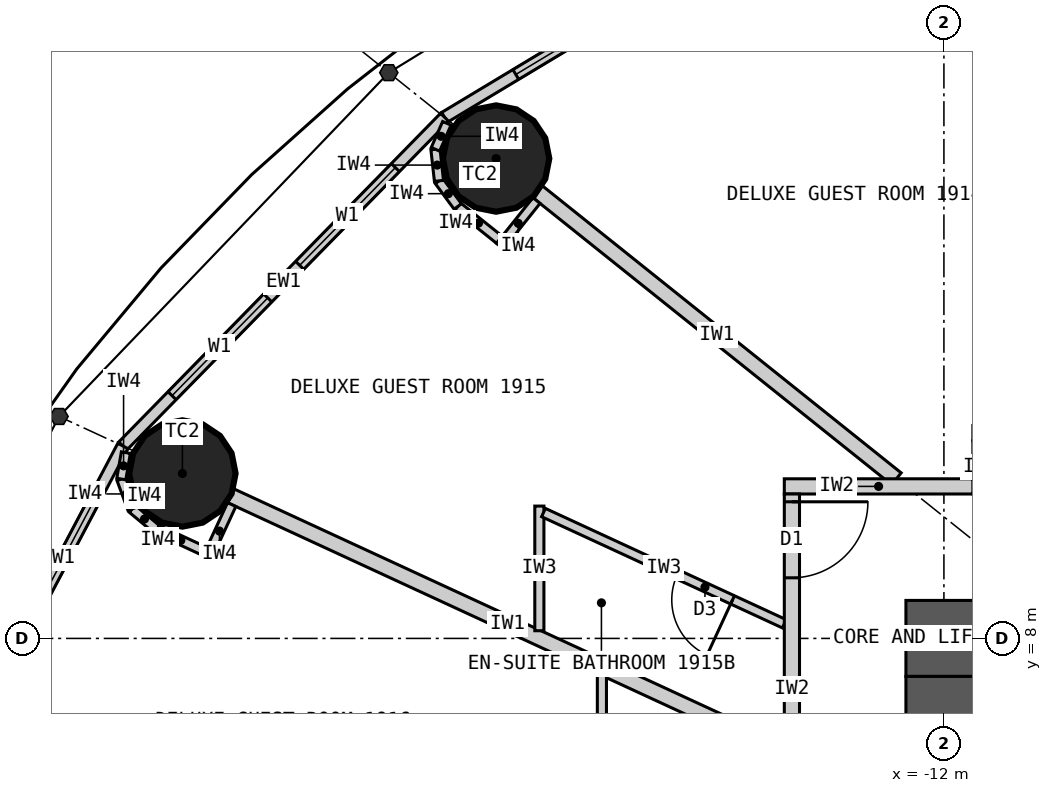
"""IFC4 building model, lengths in metres.
Left out: names, types, materials, properties, quantities, classifications, styles, units other than length and angle.
Written with IfcOpenShell. Run it as: python <this file> out.ifc"""

import sys

from ifc_helpers import new_model, si_unit, direction, frame, frame_2d, origin, origin_2d, place, context, subcontext, project, spatial, rectangle, circle, extrude, element, fill, save


model = new_model("IFC4")
c1 = context("Model", 3, precision=1e-05, world=origin(), true_north=direction((0.0, 1.0)))
c2 = subcontext(c1, "Body", "Model", "MODEL_VIEW")
j1 = project(units=[si_unit("LENGTHUNIT", "METRE"), si_unit("PLANEANGLEUNIT", "RADIAN")], contexts=[c1])
p1 = place(None, origin())
s1 = spatial("IfcSite", under=j1, at=p1, CompositionType="ELEMENT")
p2 = place(p1, origin())
s2 = spatial("IfcBuilding", under=s1, at=p2, CompositionType="ELEMENT")
p3 = place(p2, frame((0.0, 0.0, 77.1)))
s3 = spatial("IfcBuildingStorey", under=s2, at=p3, CompositionType="ELEMENT", Elevation=77.1)
for number, where, z_axis, x_axis in (
    (1, (-17.892, 14.313, 0.0), (0.0, 0.0, 1.0), (1.0, 0.0, 0.0)),
    (2, (-22.019, 10.17, 0.0), (0.0, 0.0, 1.0), (1.0, 0.0, 0.0)),
):
    element("IfcColumn", number, at=place(p3, frame(where, z_axis=z_axis, x_axis=x_axis)), inside=s3, PredefinedType="COLUMN", context=c2, shape_type="SweptSolid", body=[
        extrude(circle(Radius=0.7, at=origin_2d()), origin(), (0.0, 0.0, 1.0), 3.3),
    ])
p4 = place(p3, frame((-12.5, 8.0, 0.0), z_axis=(0.0, 0.0, 1.0), x_axis=(1.0, 0.0, 0.0)))
e3 = element("IfcWall", 3, at=p4, inside=s3, PredefinedType="SHEAR", context=c2, shape_type="SweptSolid", body=[
    extrude(rectangle(XDim=25.0, YDim=1.0, at=frame_2d((12.5, 0.0))), origin(), (0.0, 0.0, 1.0), 3.3),
])
p5 = place(p4, frame((11.2, 0.0, 0.0)))
e4 = element("IfcOpeningElement", 4, at=p5, cuts=e3, PredefinedType="OPENING", context=c2, shape_type="SweptSolid", body=[
    extrude(rectangle(XDim=1.2, YDim=2.2, at=frame_2d((0.6, 1.1))), frame((0.0, 0.51, 0.0), z_axis=(0.0, -1.0, 0.0), x_axis=(1.0, 0.0, 0.0)), (0.0, 0.0, 1.0), 1.02),
])
p6 = place(p4, frame((18.8, 0.0, 0.0)))
e5 = element("IfcOpeningElement", 5, at=p6, cuts=e3, PredefinedType="OPENING", context=c2, shape_type="SweptSolid", body=[
    extrude(rectangle(XDim=0.9, YDim=2.2, at=frame_2d((0.45, 1.1))), frame((0.0, 0.51, 0.0), z_axis=(0.0, -1.0, 0.0), x_axis=(1.0, 0.0, 0.0)), (0.0, 0.0, 1.0), 1.02),
])
p7 = place(p3, frame((-12.0, 7.5, 0.0), z_axis=(0.0, 0.0, 1.0), x_axis=(0.0, -1.0, 0.0)))
e6 = element("IfcWall", 6, at=p7, inside=s3, PredefinedType="SHEAR", context=c2, shape_type="SweptSolid", body=[
    extrude(rectangle(XDim=15.0, YDim=1.0, at=frame_2d((7.5, 0.0))), origin(), (0.0, 0.0, 1.0), 3.3),
])
p8 = place(p7, frame((6.6, 0.0, 0.0)))
e7 = element("IfcOpeningElement", 7, at=p8, cuts=e6, PredefinedType="OPENING", context=c2, shape_type="SweptSolid", body=[
    extrude(rectangle(XDim=1.8, YDim=2.2, at=frame_2d((0.9, 1.1))), frame((0.0, 0.51, 0.0), z_axis=(0.0, -1.0, 0.0), x_axis=(1.0, 0.0, 0.0)), (0.0, 0.0, 1.0), 1.02),
])
p9 = place(p3, frame((-13.096, 18.147, 0.0), z_axis=(0.0, 0.0, 1.0), x_axis=(-0.856983180864, -0.515344377787, 0.0)))
e8 = element("IfcWall", 8, at=p9, inside=s3, PredefinedType="ELEMENTEDWALL", context=c2, shape_type="SweptSolid", body=[
    extrude(rectangle(XDim=6.386, YDim=0.15, at=frame_2d((3.193, 0.0))), origin(), (0.0, 0.0, 1.0), 3.12),
])
p10 = place(p9, frame((1.093, 0.0, 0.9)))
e9 = element("IfcOpeningElement", 9, at=p10, cuts=e8, PredefinedType="OPENING", context=c2, shape_type="SweptSolid", body=[
    extrude(rectangle(XDim=1.8, YDim=1.9, at=frame_2d((0.9, 0.95))), frame((0.0, 0.085, 0.0), z_axis=(0.0, -1.0, 0.0), x_axis=(1.0, 0.0, 0.0)), (0.0, 0.0, 1.0), 0.17),
])
p11 = place(p9, frame((3.493, 0.0, 0.9)))
e10 = element("IfcOpeningElement", 10, at=p11, cuts=e8, PredefinedType="OPENING", context=c2, shape_type="SweptSolid", body=[
    extrude(rectangle(XDim=1.8, YDim=1.9, at=frame_2d((0.9, 0.95))), frame((0.0, 0.085, 0.0), z_axis=(0.0, -1.0, 0.0), x_axis=(1.0, 0.0, 0.0)), (0.0, 0.0, 1.0), 0.17),
])
p12 = place(p3, frame((-18.57, 14.856, 0.0), z_axis=(0.0, 0.0, 1.0), x_axis=(-0.699602905915, -0.714531856557, 0.0)))
e11 = element("IfcWall", 11, at=p12, inside=s3, PredefinedType="ELEMENTEDWALL", context=c2, shape_type="SweptSolid", body=[
    extrude(rectangle(XDim=6.051, YDim=0.15, at=frame_2d((3.025, 0.0))), origin(), (0.0, 0.0, 1.0), 3.12),
])
p13 = place(p12, frame((0.926, 0.0, 0.9)))
e12 = element("IfcOpeningElement", 12, at=p13, cuts=e11, PredefinedType="OPENING", context=c2, shape_type="SweptSolid", body=[
    extrude(rectangle(XDim=1.8, YDim=1.9, at=frame_2d((0.9, 0.95))), frame((0.0, 0.085, 0.0), z_axis=(0.0, -1.0, 0.0), x_axis=(1.0, 0.0, 0.0)), (0.0, 0.0, 1.0), 0.17),
])
p14 = place(p12, frame((3.325, 0.0, 0.9)))
e13 = element("IfcOpeningElement", 13, at=p14, cuts=e11, PredefinedType="OPENING", context=c2, shape_type="SweptSolid", body=[
    extrude(rectangle(XDim=1.8, YDim=1.9, at=frame_2d((0.9, 0.95))), frame((0.0, 0.085, 0.0), z_axis=(0.0, -1.0, 0.0), x_axis=(1.0, 0.0, 0.0)), (0.0, 0.0, 1.0), 0.17),
])
p15 = place(p3, frame((-22.803, 10.532, 0.0), z_axis=(0.0, 0.0, 1.0), x_axis=(-0.467296867008, -0.884100468321, 0.0)))
e14 = element("IfcWall", 14, at=p15, inside=s3, PredefinedType="ELEMENTEDWALL", context=c2, shape_type="SweptSolid", body=[
    extrude(rectangle(XDim=5.734, YDim=0.15, at=frame_2d((2.867, 0.0))), origin(), (0.0, 0.0, 1.0), 3.12),
])
p16 = place(p15, frame((0.767, 0.0, 0.9)))
e15 = element("IfcOpeningElement", 15, at=p16, cuts=e14, PredefinedType="OPENING", context=c2, shape_type="SweptSolid", body=[
    extrude(rectangle(XDim=1.8, YDim=1.9, at=frame_2d((0.9, 0.95))), frame((0.0, 0.085, 0.0), z_axis=(0.0, -1.0, 0.0), x_axis=(1.0, 0.0, 0.0)), (0.0, 0.0, 1.0), 0.17),
])
p17 = place(p15, frame((3.167, 0.0, 0.9)))
e16 = element("IfcOpeningElement", 16, at=p17, cuts=e14, PredefinedType="OPENING", context=c2, shape_type="SweptSolid", body=[
    extrude(rectangle(XDim=1.8, YDim=1.9, at=frame_2d((0.9, 0.95))), frame((0.0, 0.085, 0.0), z_axis=(0.0, -1.0, 0.0), x_axis=(1.0, 0.0, 0.0)), (0.0, 0.0, 1.0), 0.17),
])
p18 = place(p3, frame((-7.289, 10.1, 0.0), z_axis=(0.0, 0.0, 1.0), x_axis=(-0.585198353053, 0.810890182197, 0.0)))
e17 = element("IfcWall", 17, at=p18, inside=s3, PredefinedType="PARTITIONING", context=c2, shape_type="SweptSolid", body=[
    extrude(rectangle(XDim=8.36, YDim=0.2, at=frame_2d((4.18, 0.0))), origin(), (0.0, 0.0, 1.0), 2.32),
])
p19 = place(p3, frame((-12.625, 10.1, 0.0), z_axis=(0.0, 0.0, 1.0), x_axis=(-0.780892451574, 0.624665493744, 0.0)))
e18 = element("IfcWall", 18, at=p19, inside=s3, PredefinedType="PARTITIONING", context=c2, shape_type="SweptSolid", body=[
    extrude(rectangle(XDim=6.045, YDim=0.2, at=frame_2d((3.022, 0.0))), origin(), (0.0, 0.0, 1.0), 2.32),
])
p20 = place(p3, frame((-14.1, 6.512, 0.0), z_axis=(0.0, 0.0, 1.0), x_axis=(-0.907832871056, 0.419332181247, 0.0)))
e19 = element("IfcWall", 19, at=p20, inside=s3, PredefinedType="PARTITIONING", context=c2, shape_type="SweptSolid", body=[
    extrude(rectangle(XDim=8.023, YDim=0.2, at=frame_2d((4.011, 0.0))), origin(), (0.0, 0.0, 1.0), 2.32),
])
p21 = place(p3, frame((-17.323, 8.101, 0.0), z_axis=(0.0, 0.0, 1.0), x_axis=(0.0, 1.0, 0.0)))
e20 = element("IfcWall", 20, at=p21, inside=s3, PredefinedType="PARTITIONING", context=c2, shape_type="SweptSolid", body=[
    extrude(rectangle(XDim=1.64, YDim=0.12, at=frame_2d((0.82, 0.0))), origin(), (0.0, 0.0, 1.0), 3.12),
])
p22 = place(p3, frame((-14.1, 8.193, 0.0), z_axis=(0.0, 0.0, 1.0), x_axis=(-0.907836493557, 0.419324338628, 0.0)))
e21 = element("IfcWall", 21, at=p22, inside=s3, PredefinedType="PARTITIONING", context=c2, shape_type="SweptSolid", body=[
    extrude(rectangle(XDim=3.49, YDim=0.12, at=frame_2d((1.745, 0.0))), origin(), (0.0, 0.0, 1.0), 3.12),
])
p23 = place(p22, frame((0.75, 0.0, 0.0)))
e22 = element("IfcOpeningElement", 22, at=p23, cuts=e21, PredefinedType="OPENING", context=c2, shape_type="SweptSolid", body=[
    extrude(rectangle(XDim=0.8, YDim=2.1, at=frame_2d((0.4, 1.05))), frame((0.0, 0.07, 0.0), z_axis=(0.0, -1.0, 0.0), x_axis=(1.0, 0.0, 0.0)), (0.0, 0.0, 1.0), 0.14),
])
p24 = place(p3, frame((-16.5, 7.521, 0.0), z_axis=(0.0, 0.0, 1.0), x_axis=(0.0, -1.0, 0.0)))
e23 = element("IfcWall", 23, at=p24, inside=s3, PredefinedType="PARTITIONING", context=c2, shape_type="SweptSolid", body=[
    extrude(rectangle(XDim=2.749, YDim=0.12, at=frame_2d((1.374, 0.0))), origin(), (0.0, 0.0, 1.0), 3.12),
])
p25 = place(p3, frame((-14.1, 10.0, 0.0), z_axis=(0.0, 0.0, 1.0), x_axis=(1.0, 0.0, 0.0)))
e24 = element("IfcWall", 24, at=p25, inside=s3, PredefinedType="PARTITIONING", context=c2, shape_type="SweptSolid", body=[
    extrude(rectangle(XDim=2.481, YDim=0.2, at=frame_2d((1.24, 0.0))), origin(), (0.0, 0.0, 1.0), 3.12),
])
p26 = place(p3, frame((-14.0, 9.9, 0.0), z_axis=(0.0, 0.0, 1.0), x_axis=(0.0, -1.0, 0.0)))
e25 = element("IfcWall", 25, at=p26, inside=s3, PredefinedType="PARTITIONING", context=c2, shape_type="SweptSolid", body=[
    extrude(rectangle(XDim=5.127, YDim=0.2, at=frame_2d((2.564, 0.0))), origin(), (0.0, 0.0, 1.0), 3.12),
])
p27 = place(p26, frame((0.103, 0.0, 0.0)))
e26 = element("IfcOpeningElement", 26, at=p27, cuts=e25, PredefinedType="OPENING", context=c2, shape_type="SweptSolid", body=[
    extrude(rectangle(XDim=1.0, YDim=2.2, at=frame_2d((0.5, 1.1))), frame((0.0, 0.11, 0.0), z_axis=(0.0, -1.0, 0.0), x_axis=(1.0, 0.0, 0.0)), (0.0, 0.0, 1.0), 0.22),
])
p28 = place(p3, frame((-17.361, 13.76, 0.0), z_axis=(0.0, 0.0, 1.0), x_axis=(-0.624501042889, -0.781023973659, 0.0)))
e27 = element("IfcWall", 27, at=p28, inside=s3, PredefinedType="PARTITIONING", context=c2, shape_type="SweptSolid", body=[
    extrude(rectangle(XDim=0.767, YDim=0.12, at=frame_2d((0.384, 0.0))), origin(), (0.0, 0.0, 1.0), 3.12),
])
p29 = place(p3, frame((-17.85, 13.246, 0.0), z_axis=(0.0, 0.0, 1.0), x_axis=(-0.780902834923, 0.62465251333, 0.0)))
e28 = element("IfcWall", 28, at=p29, inside=s3, PredefinedType="PARTITIONING", context=c2, shape_type="SweptSolid", body=[
    extrude(rectangle(XDim=0.7, YDim=0.12, at=frame_2d((0.35, 0.0))), origin(), (0.0, 0.0, 1.0), 3.12),
])
for number, where, z_axis, x_axis in (
    (29, (-18.396, 13.683, 0.0), (0.0, 0.0, 1.0), (-0.592, 0.806, 0.0)),
    (30, (-18.644, 14.02, 0.0), (0.0, 0.0, 1.0), (-0.11, 0.994, 0.0)),
):
    element("IfcWall", number, at=place(p3, frame(where, z_axis=z_axis, x_axis=x_axis)), inside=s3, PredefinedType="PARTITIONING", context=c2, shape_type="SweptSolid", body=[
        extrude(rectangle(XDim=0.418, YDim=0.12, at=frame_2d((0.209, 0.0))), origin(), (0.0, 0.0, 1.0), 3.12),
    ])
p30 = place(p3, frame((-18.69, 14.435, 0.0), z_axis=(0.0, 0.0, 1.0), x_axis=(0.401093412634, 0.91603715773, 0.0)))
e31 = element("IfcWall", 31, at=p30, inside=s3, PredefinedType="PARTITIONING", context=c2, shape_type="SweptSolid", body=[
    extrude(rectangle(XDim=0.373, YDim=0.12, at=frame_2d((0.187, 0.0))), origin(), (0.0, 0.0, 1.0), 3.12),
])
p31 = place(p3, frame((-21.371, 9.761, 0.0), z_axis=(0.0, 0.0, 1.0), x_axis=(-0.419259891039, -0.907866258744, 0.0)))
e32 = element("IfcWall", 32, at=p31, inside=s3, PredefinedType="PARTITIONING", context=c2, shape_type="SweptSolid", body=[
    extrude(rectangle(XDim=0.768, YDim=0.12, at=frame_2d((0.384, 0.0))), origin(), (0.0, 0.0, 1.0), 3.12),
])
p32 = place(p3, frame((-21.722, 9.144, 0.0), z_axis=(0.0, 0.0, 1.0), x_axis=(-0.907877701396, 0.419235112208, 0.0)))
e33 = element("IfcWall", 33, at=p32, inside=s3, PredefinedType="PARTITIONING", context=c2, shape_type="SweptSolid", body=[
    extrude(rectangle(XDim=0.7, YDim=0.12, at=frame_2d((0.35, 0.0))), origin(), (0.0, 0.0, 1.0), 3.12),
])
p33 = place(p3, frame((-22.358, 9.437, 0.0), z_axis=(0.0, 0.0, 1.0), x_axis=(-0.768412687942, 0.639954639806, 0.0)))
e34 = element("IfcWall", 34, at=p33, inside=s3, PredefinedType="PARTITIONING", context=c2, shape_type="SweptSolid", body=[
    extrude(rectangle(XDim=0.418, YDim=0.12, at=frame_2d((0.209, 0.0))), origin(), (0.0, 0.0, 1.0), 3.12),
])
p34 = place(p3, frame((-22.679, 9.705, 0.0), z_axis=(0.0, 0.0, 1.0), x_axis=(-0.345164001646, 0.938542386879, 0.0)))
e35 = element("IfcWall", 35, at=p34, inside=s3, PredefinedType="PARTITIONING", context=c2, shape_type="SweptSolid", body=[
    extrude(rectangle(XDim=0.418, YDim=0.12, at=frame_2d((0.209, 0.0))), origin(), (0.0, 0.0, 1.0), 3.12),
])
p35 = place(p3, frame((-22.823, 10.097, 0.0), z_axis=(0.0, 0.0, 1.0), x_axis=(0.169674995186, 0.985500074079, 0.0)))
e36 = element("IfcWall", 36, at=p35, inside=s3, PredefinedType="PARTITIONING", context=c2, shape_type="SweptSolid", body=[
    extrude(rectangle(XDim=0.353, YDim=0.12, at=frame_2d((0.176, 0.0))), origin(), (0.0, 0.0, 1.0), 3.12),
])
p36 = place(p11, origin())
e37 = element("IfcWindow", 37, at=p36, inside=s3, PartitioningType="SINGLE_PANEL", PredefinedType="WINDOW", context=c2, shape_type="SweptSolid", body=[
    extrude(rectangle(XDim=1.8, YDim=1.9, at=frame_2d((0.9, 0.95))), frame((0.0, 0.03, 0.0), z_axis=(0.0, -1.0, 0.0), x_axis=(1.0, 0.0, 0.0)), (0.0, 0.0, 1.0), 0.06),
])
fill(e10, e37)
p37 = place(p13, origin())
e38 = element("IfcWindow", 38, at=p37, inside=s3, PartitioningType="SINGLE_PANEL", PredefinedType="WINDOW", context=c2, shape_type="SweptSolid", body=[
    extrude(rectangle(XDim=1.8, YDim=1.9, at=frame_2d((0.9, 0.95))), frame((0.0, 0.03, 0.0), z_axis=(0.0, -1.0, 0.0), x_axis=(1.0, 0.0, 0.0)), (0.0, 0.0, 1.0), 0.06),
])
fill(e12, e38)
p38 = place(p14, origin())
e39 = element("IfcWindow", 39, at=p38, inside=s3, PartitioningType="SINGLE_PANEL", PredefinedType="WINDOW", context=c2, shape_type="SweptSolid", body=[
    extrude(rectangle(XDim=1.8, YDim=1.9, at=frame_2d((0.9, 0.95))), frame((0.0, 0.03, 0.0), z_axis=(0.0, -1.0, 0.0), x_axis=(1.0, 0.0, 0.0)), (0.0, 0.0, 1.0), 0.06),
])
fill(e13, e39)
p39 = place(p16, origin())
e40 = element("IfcWindow", 40, at=p39, inside=s3, PartitioningType="SINGLE_PANEL", PredefinedType="WINDOW", context=c2, shape_type="SweptSolid", body=[
    extrude(rectangle(XDim=1.8, YDim=1.9, at=frame_2d((0.9, 0.95))), frame((0.0, 0.03, 0.0), z_axis=(0.0, -1.0, 0.0), x_axis=(1.0, 0.0, 0.0)), (0.0, 0.0, 1.0), 0.06),
])
fill(e15, e40)
p40 = place(p23, origin())
e41 = element("IfcDoor", 41, at=p40, inside=s3, OperationType="SINGLE_SWING_LEFT", PredefinedType="DOOR", context=c2, shape_type="SweptSolid", body=[
    extrude(rectangle(XDim=0.8, YDim=2.1, at=frame_2d((0.4, 1.05))), frame((0.0, 0.025, 0.0), z_axis=(0.0, -1.0, 0.0), x_axis=(1.0, 0.0, 0.0)), (0.0, 0.0, 1.0), 0.05),
])
fill(e22, e41)
p41 = place(p27, origin())
e42 = element("IfcDoor", 42, at=p41, inside=s3, OperationType="SINGLE_SWING_LEFT", PredefinedType="DOOR", context=c2, shape_type="SweptSolid", body=[
    extrude(rectangle(XDim=1.0, YDim=2.2, at=frame_2d((0.5, 1.1))), frame((0.0, 0.025, 0.0), z_axis=(0.0, -1.0, 0.0), x_axis=(1.0, 0.0, 0.0)), (0.0, 0.0, 1.0), 0.05),
])
fill(e26, e42)
save(model, sys.argv[1])
